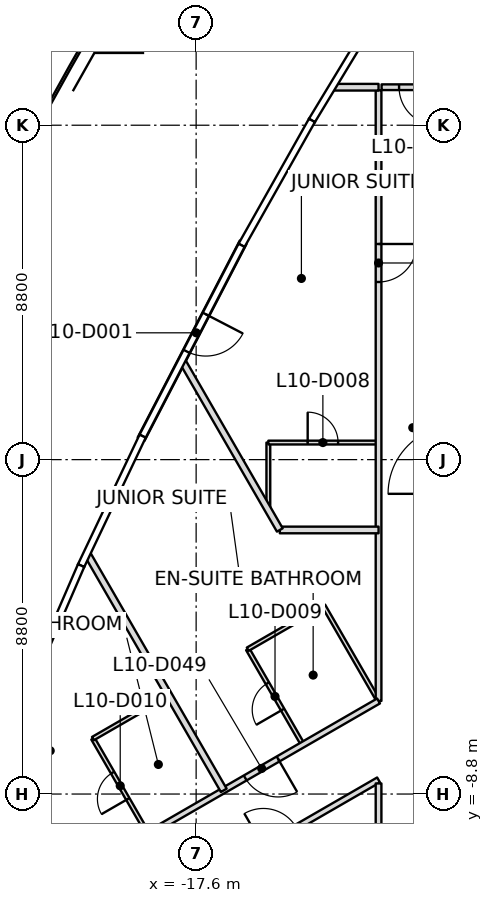
"""IFC4 building model, lengths in metres.
Left out: names, types, materials, properties, quantities, classifications, styles, units other than length and angle.
Written with IfcOpenShell. Run it as: python <this file> out.ifc"""

import sys

from ifc_helpers import new_model, si_unit, direction, frame, frame_2d, origin, origin_2d, place, context, subcontext, project, spatial, rectangle, extrude, element, fill, save


model = new_model("IFC4")
c1 = context("Model", 3, precision=1e-05, world=origin(), true_north=direction((0.0, 1.0)))
c2 = subcontext(c1, "Body", "Model", "MODEL_VIEW")
j1 = project(units=[si_unit("LENGTHUNIT", "METRE"), si_unit("PLANEANGLEUNIT", "RADIAN")], contexts=[c1])
p1 = place(None, origin())
s1 = spatial("IfcSite", under=j1, at=p1, CompositionType="ELEMENT")
p2 = place(p1, origin())
s2 = spatial("IfcBuilding", under=s1, at=p2, CompositionType="ELEMENT")
p3 = place(p2, frame((0.0, 0.0, 59.1)))
s3 = spatial("IfcBuildingStorey", under=s2, at=p3, CompositionType="ELEMENT", Elevation=59.1)
p4 = place(p3, frame((-19.63, 11.333, 0.0), z_axis=(0.010688729499, -0.00613612249, 0.999924046647), x_axis=(0.49997143695, 0.866041893524, -2.9922579e-05)))
e1 = element("IfcColumn", 1, at=p4, inside=s3, PredefinedType="COLUMN", context=c2, shape_type="SweptSolid", body=[
    extrude(rectangle(XDim=1.2, YDim=1.2, at=origin_2d()), origin(), (0.0, 0.0, 1.0), 3.7),
])
p5 = place(p3, frame((-16.363, 5.72, 0.0), z_axis=(0.0, 0.0, 1.0), x_axis=(-0.46026588587, -0.887781118466, 0.0)))
e2 = element("IfcWall", 2, at=p5, inside=s3, PredefinedType="SOLIDWALL", context=c2, shape_type="SweptSolid", body=[
    extrude(rectangle(XDim=5.837, YDim=0.2, at=frame_2d((2.918, 0.0))), origin(), (0.0, 0.0, 1.0), 3.017),
])
p6 = place(p5, frame((2.134, 0.0, 0.0)))
e3 = element("IfcOpeningElement", 3, at=p6, cuts=e2, PredefinedType="OPENING", context=c2, shape_type="SweptSolid", body=[
    extrude(rectangle(XDim=1.1, YDim=2.1, at=frame_2d((0.55, 1.05))), frame((0.0, 0.1, 0.0), z_axis=(0.0, -1.0, 0.0), x_axis=(1.0, 0.0, 0.0)), (0.0, 0.0, 1.0), 0.2),
])
p7 = place(p3, frame((-16.873, -8.702, 0.0), z_axis=(0.0, 0.0, 1.0), x_axis=(-0.500013876863, 0.866017391826, 0.0)))
e4 = element("IfcWall", 4, at=p7, inside=s3, PredefinedType="PARTITIONING", context=c2, shape_type="SweptSolid", body=[
    extrude(rectangle(XDim=7.203, YDim=0.175, at=frame_2d((3.602, 0.0))), origin(), (0.0, 0.0, 1.0), 2.947),
])
p8 = place(p3, frame((-12.8, -1.851, 0.0), z_axis=(0.0, 0.0, 1.0), x_axis=(-1.0, 0.0, 0.0)))
e5 = element("IfcWall", 5, at=p8, inside=s3, PredefinedType="PARTITIONING", context=c2, shape_type="SweptSolid", body=[
    extrude(rectangle(XDim=2.598, YDim=0.175, at=frame_2d((1.299, 0.0))), origin(), (0.0, 0.0, 1.0), 3.15),
])
p9 = place(p3, frame((-15.398, -1.851, 0.0), z_axis=(0.0, 0.0, 1.0), x_axis=(-0.500028719662, 0.866008821845, 0.0)))
e6 = element("IfcWall", 6, at=p9, inside=s3, PredefinedType="PARTITIONING", context=c2, shape_type="SweptSolid", body=[
    extrude(rectangle(XDim=5.083, YDim=0.175, at=frame_2d((2.542, 0.0))), origin(), (0.0, 0.0, 1.0), 3.15),
])
p10 = place(p3, frame((-12.8, 9.8, 0.0), z_axis=(0.0, 0.0, 1.0), x_axis=(-1.0, 0.0, 0.0)))
e7 = element("IfcWall", 7, at=p10, inside=s3, PredefinedType="PARTITIONING", context=c2, shape_type="SweptSolid", body=[
    extrude(rectangle(XDim=1.236, YDim=0.175, at=frame_2d((0.618, 0.0))), origin(), (0.0, 0.0, 1.0), 3.15),
])
p11 = place(p3, frame((-12.8, 9.72, 0.0), z_axis=(0.0, 0.0, 1.0), x_axis=(0.0, -1.0, 0.0)))
e8 = element("IfcWall", 8, at=p11, inside=s3, PredefinedType="PARTITIONING", context=c2, shape_type="SweptSolid", body=[
    extrude(rectangle(XDim=16.071, YDim=0.15, at=frame_2d((8.035, 0.0))), origin(), (0.0, 0.0, 1.0), 3.017),
])
p12 = place(p11, frame((4.045, 0.0, 0.0)))
e9 = element("IfcOpeningElement", 9, at=p12, cuts=e8, PredefinedType="OPENING", context=c2, shape_type="SweptSolid", body=[
    extrude(rectangle(XDim=1.0, YDim=2.1, at=frame_2d((0.5, 1.05))), frame((0.0, 0.075, 0.0), z_axis=(0.0, -1.0, 0.0), x_axis=(1.0, 0.0, 0.0)), (0.0, 0.0, 1.0), 0.15),
])
p13 = place(p3, frame((-12.8, -6.351, 0.0), z_axis=(0.0, 0.0, 1.0), x_axis=(-0.866024189303, -0.500002103537, 0.0)))
e10 = element("IfcWall", 10, at=p13, inside=s3, PredefinedType="PARTITIONING", context=c2, shape_type="SweptSolid", body=[
    extrude(rectangle(XDim=13.023, YDim=0.15, at=frame_2d((6.512, 0.0))), origin(), (0.0, 0.0, 1.0), 2.947),
])
p14 = place(p13, frame((3.052, 0.0, 0.0)))
e11 = element("IfcOpeningElement", 11, at=p14, cuts=e10, PredefinedType="OPENING", context=c2, shape_type="SweptSolid", body=[
    extrude(rectangle(XDim=1.0, YDim=2.1, at=frame_2d((0.5, 1.05))), frame((0.0, 0.075, 0.0), z_axis=(0.0, -1.0, 0.0), x_axis=(1.0, 0.0, 0.0)), (0.0, 0.0, 1.0), 0.15),
])
p15 = place(p13, frame((9.603, 0.0, 0.0)))
e12 = element("IfcOpeningElement", 12, at=p15, cuts=e10, PredefinedType="OPENING", context=c2, shape_type="SweptSolid", body=[
    extrude(rectangle(XDim=1.0, YDim=2.1, at=frame_2d((0.5, 1.05))), frame((0.0, 0.075, 0.0), z_axis=(0.0, -1.0, 0.0), x_axis=(1.0, 0.0, 0.0)), (0.0, 0.0, 1.0), 0.15),
])
p16 = place(p3, frame((-23.178, -14.421, 0.0), z_axis=(0.0, 0.0, 1.0), x_axis=(0.866017993231, 0.500012835235, 0.0)))
e13 = element("IfcWall", 13, at=p16, inside=s3, PredefinedType="PARTITIONING", context=c2, shape_type="SweptSolid", body=[
    extrude(rectangle(XDim=11.984, YDim=0.15, at=frame_2d((5.992, 0.0))), origin(), (0.0, 0.0, 1.0), 2.797),
])
p17 = place(p16, frame((1.252, 0.0, 0.0)))
e14 = element("IfcOpeningElement", 14, at=p17, cuts=e13, PredefinedType="OPENING", context=c2, shape_type="SweptSolid", body=[
    extrude(rectangle(XDim=1.0, YDim=2.1, at=frame_2d((0.5, 1.05))), frame((0.0, 0.075, 0.0), z_axis=(0.0, -1.0, 0.0), x_axis=(1.0, 0.0, 0.0)), (0.0, 0.0, 1.0), 0.15),
])
p18 = place(p16, frame((8.484, 0.0, 0.0)))
e15 = element("IfcOpeningElement", 15, at=p18, cuts=e13, PredefinedType="OPENING", context=c2, shape_type="SweptSolid", body=[
    extrude(rectangle(XDim=1.0, YDim=2.1, at=frame_2d((0.5, 1.05))), frame((0.0, 0.075, 0.0), z_axis=(0.0, -1.0, 0.0), x_axis=(1.0, 0.0, 0.0)), (0.0, 0.0, 1.0), 0.15),
])
p19 = place(p3, frame((-12.8, -8.521, 0.0), z_axis=(0.0, 0.0, 1.0), x_axis=(0.0, -1.0, 0.0)))
e16 = element("IfcWall", 16, at=p19, inside=s3, PredefinedType="PARTITIONING", context=c2, shape_type="SweptSolid", body=[
    extrude(rectangle(XDim=1.199, YDim=0.15, at=frame_2d((0.6, 0.0))), origin(), (0.0, 0.0, 1.0), 2.797),
])
p20 = place(p3, frame((-4.48, 9.8, 0.0), z_axis=(0.0, 0.0, 1.0), x_axis=(-1.0, 0.0, 0.0)))
e17 = element("IfcWall", 17, at=p20, inside=s3, PredefinedType="PARTITIONING", context=c2, shape_type="SweptSolid", body=[
    extrude(rectangle(XDim=8.24, YDim=0.15, at=frame_2d((4.12, 0.0))), origin(), (0.0, 0.0, 1.0), 2.947),
])
p21 = place(p20, frame((6.78, 0.0, 0.0)))
e18 = element("IfcOpeningElement", 18, at=p21, cuts=e17, PredefinedType="OPENING", context=c2, shape_type="SweptSolid", body=[
    extrude(rectangle(XDim=1.0, YDim=2.1, at=frame_2d((0.5, 1.05))), frame((0.0, 0.075, 0.0), z_axis=(0.0, -1.0, 0.0), x_axis=(1.0, 0.0, 0.0)), (0.0, 0.0, 1.0), 0.15),
])
p22 = place(p3, frame((-18.88, -9.826, 0.0), z_axis=(0.0, 0.0, 1.0), x_axis=(-0.500036638401, 0.866004249561, 0.0)))
e19 = element("IfcWall", 19, at=p22, inside=s3, PredefinedType="PARTITIONING", context=c2, shape_type="SweptSolid", body=[
    extrude(rectangle(XDim=2.87, YDim=0.1, at=frame_2d((1.435, 0.0))), origin(), (0.0, 0.0, 1.0), 3.15),
])
p23 = place(p22, frame((1.035, 0.0, 0.0)))
e20 = element("IfcOpeningElement", 20, at=p23, cuts=e19, PredefinedType="OPENING", context=c2, shape_type="SweptSolid", body=[
    extrude(rectangle(XDim=0.8, YDim=2.1, at=frame_2d((0.4, 1.05))), frame((0.0, 0.05, 0.0), z_axis=(0.0, -1.0, 0.0), x_axis=(1.0, 0.0, 0.0)), (0.0, 0.0, 1.0), 0.1),
])
p24 = place(p3, frame((-20.315, -7.341, 0.0), z_axis=(0.0, 0.0, 1.0), x_axis=(0.866044110172, 0.499967598186, 0.0)))
e21 = element("IfcWall", 21, at=p24, inside=s3, PredefinedType="PARTITIONING", context=c2, shape_type="SweptSolid", body=[
    extrude(rectangle(XDim=2.27, YDim=0.1, at=frame_2d((1.135, 0.0))), origin(), (0.0, 0.0, 1.0), 2.947),
])
p25 = place(p3, frame((-15.7, -1.268, 0.0), z_axis=(0.0, 0.0, 1.0), x_axis=(0.0, 1.0, 0.0)))
e22 = element("IfcWall", 22, at=p25, inside=s3, PredefinedType="PARTITIONING", context=c2, shape_type="SweptSolid", body=[
    extrude(rectangle(XDim=1.717, YDim=0.1, at=frame_2d((0.858, 0.0))), origin(), (0.0, 0.0, 1.0), 3.15),
])
p26 = place(p3, frame((-15.7, 0.449, 0.0), z_axis=(0.0, 0.0, 1.0), x_axis=(1.0, 0.0, 0.0)))
e23 = element("IfcWall", 23, at=p26, inside=s3, PredefinedType="PARTITIONING", context=c2, shape_type="SweptSolid", body=[
    extrude(rectangle(XDim=2.87, YDim=0.1, at=frame_2d((1.435, 0.0))), origin(), (0.0, 0.0, 1.0), 3.017),
])
p27 = place(p26, frame((1.035, 0.0, 0.0)))
e24 = element("IfcOpeningElement", 24, at=p27, cuts=e23, PredefinedType="OPENING", context=c2, shape_type="SweptSolid", body=[
    extrude(rectangle(XDim=0.8, YDim=2.1, at=frame_2d((0.4, 1.05))), frame((0.0, 0.05, 0.0), z_axis=(0.0, -1.0, 0.0), x_axis=(1.0, 0.0, 0.0)), (0.0, 0.0, 1.0), 0.1),
])
p28 = place(p3, frame((-14.807, -7.475, 0.0), z_axis=(0.0, 0.0, 1.0), x_axis=(-0.500036638401, 0.866004249561, 0.0)))
e25 = element("IfcWall", 25, at=p28, inside=s3, PredefinedType="PARTITIONING", context=c2, shape_type="SweptSolid", body=[
    extrude(rectangle(XDim=2.87, YDim=0.1, at=frame_2d((1.435, 0.0))), origin(), (0.0, 0.0, 1.0), 2.947),
])
p29 = place(p28, frame((1.035, 0.0, 0.0)))
e26 = element("IfcOpeningElement", 26, at=p29, cuts=e25, PredefinedType="OPENING", context=c2, shape_type="SweptSolid", body=[
    extrude(rectangle(XDim=0.8, YDim=2.1, at=frame_2d((0.4, 1.05))), frame((0.0, 0.05, 0.0), z_axis=(0.0, -1.0, 0.0), x_axis=(1.0, 0.0, 0.0)), (0.0, 0.0, 1.0), 0.1),
])
p30 = place(p3, frame((-16.242, -4.99, 0.0), z_axis=(0.0, 0.0, 1.0), x_axis=(0.866007057882, 0.500031774688, 0.0)))
e27 = element("IfcWall", 27, at=p30, inside=s3, PredefinedType="PARTITIONING", context=c2, shape_type="SweptSolid", body=[
    extrude(rectangle(XDim=2.3, YDim=0.1, at=frame_2d((1.15, 0.0))), origin(), (0.0, 0.0, 1.0), 3.15),
])
p31 = place(p3, frame((-14.25, -3.839, 0.0), z_axis=(0.0, 0.0, 1.0), x_axis=(0.499985389037, -0.866033839264, 0.0)))
e28 = element("IfcWall", 28, at=p31, inside=s3, PredefinedType="PARTITIONING", context=c2, shape_type="SweptSolid", body=[
    extrude(rectangle(XDim=2.84, YDim=0.1, at=frame_2d((1.42, 0.0))), origin(), (0.0, 0.0, 1.0), 3.15),
])
p32 = place(p6, origin())
e29 = element("IfcDoor", 29, at=p32, inside=s3, OperationType="SINGLE_SWING_LEFT", PredefinedType="DOOR", context=c2, shape_type="SweptSolid", body=[
    extrude(rectangle(XDim=1.1, YDim=2.1, at=frame_2d((0.55, 1.05))), frame((0.0, 0.025, 0.0), z_axis=(0.0, -1.0, 0.0), x_axis=(1.0, 0.0, 0.0)), (0.0, 0.0, 1.0), 0.05),
])
fill(e3, e29)
p33 = place(p21, origin())
e30 = element("IfcDoor", 30, at=p33, inside=s3, OperationType="SINGLE_SWING_RIGHT", PredefinedType="DOOR", context=c2, shape_type="SweptSolid", body=[
    extrude(rectangle(XDim=1.0, YDim=2.1, at=frame_2d((0.5, 1.05))), frame((0.0, 0.025, 0.0), z_axis=(0.0, -1.0, 0.0), x_axis=(1.0, 0.0, 0.0)), (0.0, 0.0, 1.0), 0.05),
])
fill(e18, e30)
p34 = place(p12, origin())
e31 = element("IfcDoor", 31, at=p34, inside=s3, OperationType="SINGLE_SWING_RIGHT", PredefinedType="DOOR", context=c2, shape_type="SweptSolid", body=[
    extrude(rectangle(XDim=1.0, YDim=2.1, at=frame_2d((0.5, 1.05))), frame((0.0, 0.025, 0.0), z_axis=(0.0, -1.0, 0.0), x_axis=(1.0, 0.0, 0.0)), (0.0, 0.0, 1.0), 0.05),
])
fill(e9, e31)
p35 = place(p27, origin())
e32 = element("IfcDoor", 32, at=p35, inside=s3, OperationType="SINGLE_SWING_LEFT", PredefinedType="DOOR", context=c2, shape_type="SweptSolid", body=[
    extrude(rectangle(XDim=0.8, YDim=2.1, at=frame_2d((0.4, 1.05))), frame((0.0, 0.025, 0.0), z_axis=(0.0, -1.0, 0.0), x_axis=(1.0, 0.0, 0.0)), (0.0, 0.0, 1.0), 0.05),
])
fill(e24, e32)
p36 = place(p14, origin())
e33 = element("IfcDoor", 33, at=p36, inside=s3, OperationType="SINGLE_SWING_LEFT", PredefinedType="DOOR", context=c2, shape_type="SweptSolid", body=[
    extrude(rectangle(XDim=1.0, YDim=2.1, at=frame_2d((0.5, 1.05))), frame((0.0, 0.025, 0.0), z_axis=(0.0, -1.0, 0.0), x_axis=(1.0, 0.0, 0.0)), (0.0, 0.0, 1.0), 0.05),
])
fill(e11, e33)
p37 = place(p29, origin())
e34 = element("IfcDoor", 34, at=p37, inside=s3, OperationType="SINGLE_SWING_RIGHT", PredefinedType="DOOR", context=c2, shape_type="SweptSolid", body=[
    extrude(rectangle(XDim=0.8, YDim=2.1, at=frame_2d((0.4, 1.05))), frame((0.0, 0.025, 0.0), z_axis=(0.0, -1.0, 0.0), x_axis=(1.0, 0.0, 0.0)), (0.0, 0.0, 1.0), 0.05),
])
fill(e26, e34)
p38 = place(p23, origin())
e35 = element("IfcDoor", 35, at=p38, inside=s3, OperationType="SINGLE_SWING_RIGHT", PredefinedType="DOOR", context=c2, shape_type="SweptSolid", body=[
    extrude(rectangle(XDim=0.8, YDim=2.1, at=frame_2d((0.4, 1.05))), frame((0.0, 0.025, 0.0), z_axis=(0.0, -1.0, 0.0), x_axis=(1.0, 0.0, 0.0)), (0.0, 0.0, 1.0), 0.05),
])
fill(e20, e35)
save(model, sys.argv[1])
